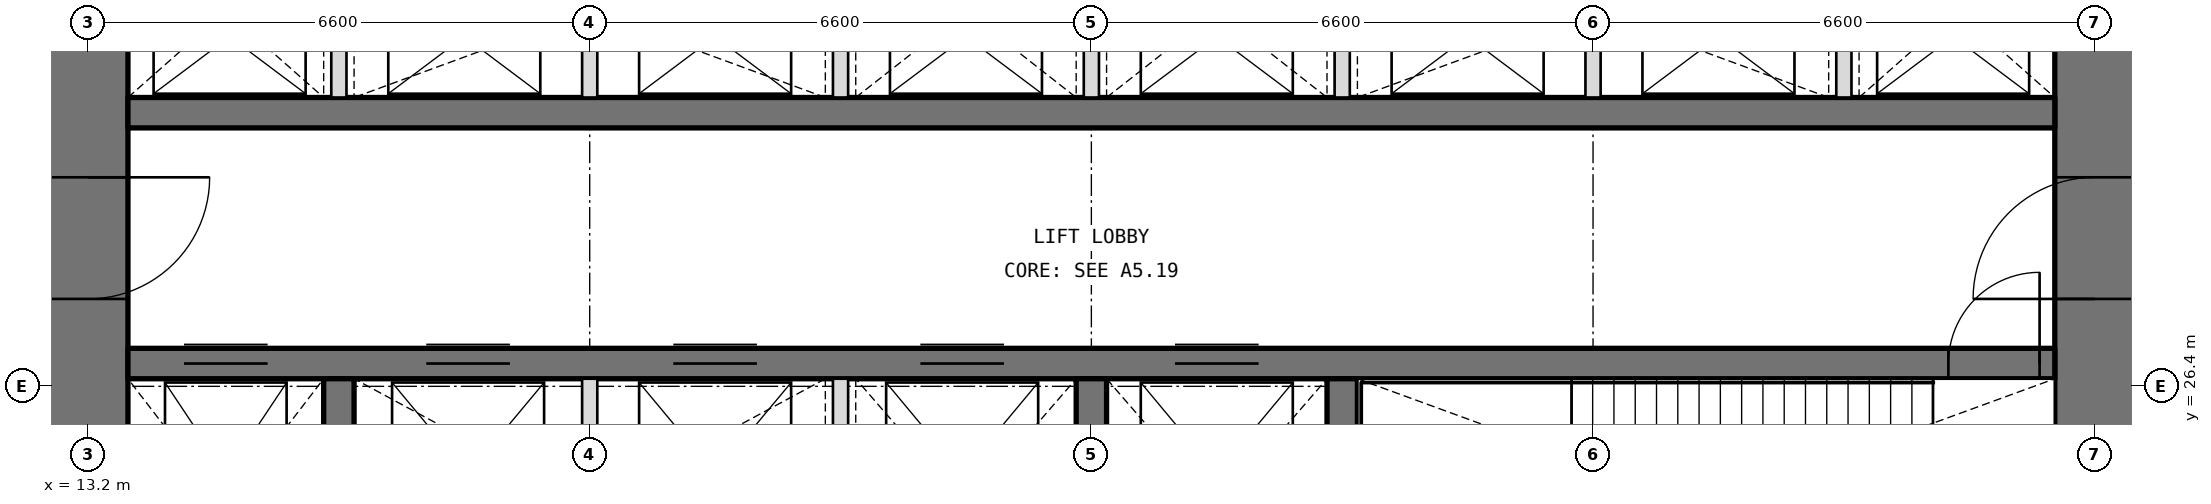
"""IFC4 building model, lengths in metres.
Left out: names, types, materials, properties, quantities, classifications, styles, units other than length and angle.
Written with IfcOpenShell. Run it as: python <this file> out.ifc"""

import sys

from ifc_helpers import new_model, si_unit, direction, frame, frame_2d, origin, place, context, subcontext, project, spatial, rectangle, extrude, element, fill, save


model = new_model("IFC4")
c1 = context("Model", 3, precision=1e-05, world=origin(), true_north=direction((0.0, 1.0)))
c2 = subcontext(c1, "Body", "Model", "MODEL_VIEW")
j1 = project(units=[si_unit("LENGTHUNIT", "METRE"), si_unit("PLANEANGLEUNIT", "RADIAN")], contexts=[c1])
p1 = place(None, origin())
s1 = spatial("IfcSite", under=j1, at=p1, CompositionType="ELEMENT")
p2 = place(p1, origin())
s2 = spatial("IfcBuilding", under=s1, at=p2, CompositionType="ELEMENT")
p3 = place(p2, frame((0.0, 0.0, 75.9)))
s3 = spatial("IfcBuildingStorey", under=s2, at=p3, CompositionType="ELEMENT", Elevation=75.9)
p4 = place(p3, frame((39.6, 13.725, 0.0), z_axis=(0.0, 0.0, 1.0), x_axis=(0.0, 1.0, 0.0)))
e1 = element("IfcWall", 1, at=p4, inside=s3, PredefinedType="SHEAR", context=c2, shape_type="SweptSolid", body=[
    extrude(rectangle(XDim=18.75, YDim=1.05, at=frame_2d((9.375, 0.0))), origin(), (0.0, 0.0, 1.0), 6.3),
])
p5 = place(p4, frame((3.025, 0.0, 0.0)))
e2 = element("IfcOpeningElement", 2, at=p5, cuts=e1, PredefinedType="OPENING", context=c2, shape_type="SweptSolid", body=[
    extrude(rectangle(XDim=1.6, YDim=2.1, at=frame_2d((0.8, 1.05))), frame((0.0, 0.535, 0.0), z_axis=(0.0, -1.0, 0.0), x_axis=(1.0, 0.0, 0.0)), (0.0, 0.0, 1.0), 1.07),
])
p6 = place(p4, frame((13.825, 0.0, 0.0)))
e3 = element("IfcOpeningElement", 3, at=p6, cuts=e1, PredefinedType="OPENING", context=c2, shape_type="SweptSolid", body=[
    extrude(rectangle(XDim=1.6, YDim=2.1, at=frame_2d((0.8, 1.05))), frame((0.0, 0.535, 0.0), z_axis=(0.0, -1.0, 0.0), x_axis=(1.0, 0.0, 0.0)), (0.0, 0.0, 1.0), 1.07),
])
p7 = place(p3, frame((13.2, 32.475, 0.0), z_axis=(0.0, 0.0, 1.0), x_axis=(0.0, -1.0, 0.0)))
e4 = element("IfcWall", 4, at=p7, inside=s3, PredefinedType="SHEAR", context=c2, shape_type="SweptSolid", body=[
    extrude(rectangle(XDim=18.75, YDim=1.05, at=frame_2d((9.375, 0.0))), origin(), (0.0, 0.0, 1.0), 6.3),
])
p8 = place(p7, frame((14.125, 0.0, 0.0)))
e5 = element("IfcOpeningElement", 5, at=p8, cuts=e4, PredefinedType="OPENING", context=c2, shape_type="SweptSolid", body=[
    extrude(rectangle(XDim=1.6, YDim=2.1, at=frame_2d((0.8, 1.05))), frame((0.0, 0.535, 0.0), z_axis=(0.0, -1.0, 0.0), x_axis=(1.0, 0.0, 0.0)), (0.0, 0.0, 1.0), 1.07),
])
p9 = place(p7, frame((3.325, 0.0, 0.0)))
e6 = element("IfcOpeningElement", 6, at=p9, cuts=e4, PredefinedType="OPENING", context=c2, shape_type="SweptSolid", body=[
    extrude(rectangle(XDim=1.6, YDim=2.1, at=frame_2d((0.8, 1.05))), frame((0.0, 0.535, 0.0), z_axis=(0.0, -1.0, 0.0), x_axis=(1.0, 0.0, 0.0)), (0.0, 0.0, 1.0), 1.07),
])
p10 = place(p3, frame((13.725, 26.7, 0.0), z_axis=(0.0, 0.0, 1.0), x_axis=(1.0, 0.0, 0.0)))
e7 = element("IfcWall", 7, at=p10, inside=s3, PredefinedType="SHEAR", context=c2, shape_type="SweptSolid", body=[
    extrude(rectangle(XDim=25.35, YDim=0.4, at=frame_2d((12.675, 0.0))), origin(), (0.0, 0.0, 1.0), 6.3),
])
p11 = place(p10, frame((23.95, 0.0, 0.0)))
e8 = element("IfcOpeningElement", 8, at=p11, cuts=e7, PredefinedType="OPENING", context=c2, shape_type="SweptSolid", body=[
    extrude(rectangle(XDim=1.2, YDim=2.1, at=frame_2d((0.6, 1.05))), frame((0.0, 0.21, 0.0), z_axis=(0.0, -1.0, 0.0), x_axis=(1.0, 0.0, 0.0)), (0.0, 0.0, 1.0), 0.42),
])
p12 = place(p10, frame((0.738, 0.0, 0.0)))
e9 = element("IfcOpeningElement", 9, at=p12, cuts=e7, PredefinedType="OPENING", context=c2, shape_type="SweptSolid", body=[
    extrude(rectangle(XDim=1.1, YDim=2.1, at=frame_2d((0.55, 1.05))), frame((0.0, 0.21, 0.0), z_axis=(0.0, -1.0, 0.0), x_axis=(1.0, 0.0, 0.0)), (0.0, 0.0, 1.0), 0.42),
])
p13 = place(p10, frame((3.925, 0.0, 0.0)))
e10 = element("IfcOpeningElement", 10, at=p13, cuts=e7, PredefinedType="OPENING", context=c2, shape_type="SweptSolid", body=[
    extrude(rectangle(XDim=1.1, YDim=2.1, at=frame_2d((0.55, 1.05))), frame((0.0, 0.21, 0.0), z_axis=(0.0, -1.0, 0.0), x_axis=(1.0, 0.0, 0.0)), (0.0, 0.0, 1.0), 0.42),
])
p14 = place(p10, frame((7.175, 0.0, 0.0)))
e11 = element("IfcOpeningElement", 11, at=p14, cuts=e7, PredefinedType="OPENING", context=c2, shape_type="SweptSolid", body=[
    extrude(rectangle(XDim=1.1, YDim=2.1, at=frame_2d((0.55, 1.05))), frame((0.0, 0.21, 0.0), z_axis=(0.0, -1.0, 0.0), x_axis=(1.0, 0.0, 0.0)), (0.0, 0.0, 1.0), 0.42),
])
p15 = place(p10, frame((10.425, 0.0, 0.0)))
e12 = element("IfcOpeningElement", 12, at=p15, cuts=e7, PredefinedType="OPENING", context=c2, shape_type="SweptSolid", body=[
    extrude(rectangle(XDim=1.1, YDim=2.1, at=frame_2d((0.55, 1.05))), frame((0.0, 0.21, 0.0), z_axis=(0.0, -1.0, 0.0), x_axis=(1.0, 0.0, 0.0)), (0.0, 0.0, 1.0), 0.42),
])
p16 = place(p10, frame((13.775, 0.0, 0.0)))
e13 = element("IfcOpeningElement", 13, at=p16, cuts=e7, PredefinedType="OPENING", context=c2, shape_type="SweptSolid", body=[
    extrude(rectangle(XDim=1.1, YDim=2.1, at=frame_2d((0.55, 1.05))), frame((0.0, 0.21, 0.0), z_axis=(0.0, -1.0, 0.0), x_axis=(1.0, 0.0, 0.0)), (0.0, 0.0, 1.0), 0.42),
])
p17 = place(p3, frame((13.725, 30.0, 0.0), z_axis=(0.0, 0.0, 1.0), x_axis=(1.0, 0.0, 0.0)))
e14 = element("IfcWall", 14, at=p17, inside=s3, PredefinedType="SHEAR", context=c2, shape_type="SweptSolid", body=[
    extrude(rectangle(XDim=25.35, YDim=0.4, at=frame_2d((12.675, 0.0))), origin(), (0.0, 0.0, 1.0), 6.3),
])
for number, where, z_axis, x_axis in (
    (15, (16.5, 23.15, 0.0), (0.0, 0.0, 1.0), (0.0, 1.0, 0.0)),
    (16, (26.4, 23.15, 0.0), (0.0, 0.0, 1.0), (0.0, 1.0, 0.0)),
    (17, (29.7, 23.15, 0.0), (0.0, 0.0, 1.0), (0.0, 1.0, 0.0)),
):
    element("IfcWall", number, at=place(p3, frame(where, z_axis=z_axis, x_axis=x_axis)), inside=s3, PredefinedType="SHEAR", context=c2, shape_type="SweptSolid", body=[
        extrude(rectangle(XDim=3.35, YDim=0.4, at=frame_2d((1.675, 0.0))), origin(), (0.0, 0.0, 1.0), 6.3),
    ])
for number, where, z_axis, x_axis in (
    (18, (16.5, 30.2, 0.0), (0.0, 0.0, 1.0), (0.0, 1.0, 0.0)),
    (19, (19.8, 30.2, 0.0), (0.0, 0.0, 1.0), (0.0, 1.0, 0.0)),
    (20, (23.1, 30.2, 0.0), (0.0, 0.0, 1.0), (0.0, 1.0, 0.0)),
    (21, (26.4, 30.2, 0.0), (0.0, 0.0, 1.0), (0.0, 1.0, 0.0)),
    (22, (29.7, 30.2, 0.0), (0.0, 0.0, 1.0), (0.0, 1.0, 0.0)),
    (23, (33.0, 30.2, 0.0), (0.0, 0.0, 1.0), (0.0, 1.0, 0.0)),
    (24, (36.3, 30.2, 0.0), (0.0, 0.0, 1.0), (0.0, 1.0, 0.0)),
):
    element("IfcWall", number, at=place(p3, frame(where, z_axis=z_axis, x_axis=x_axis)), inside=s3, PredefinedType="PARTITIONING", context=c2, shape_type="SweptSolid", body=[
        extrude(rectangle(XDim=2.275, YDim=0.2, at=frame_2d((1.138, 0.0))), origin(), (0.0, 0.0, 1.0), 6.3),
    ])
for number, where, z_axis, x_axis in (
    (25, (19.8, 23.15, 0.0), (0.0, 0.0, 1.0), (0.0, 1.0, 0.0)),
    (26, (23.1, 23.15, 0.0), (0.0, 0.0, 1.0), (0.0, 1.0, 0.0)),
):
    element("IfcWall", number, at=place(p3, frame(where, z_axis=z_axis, x_axis=x_axis)), inside=s3, PredefinedType="PARTITIONING", context=c2, shape_type="SweptSolid", body=[
        extrude(rectangle(XDim=3.35, YDim=0.2, at=frame_2d((1.675, 0.0))), origin(), (0.0, 0.0, 1.0), 6.3),
    ])
p18 = place(p11, origin())
e27 = element("IfcDoor", 27, at=p18, inside=s3, OperationType="SINGLE_SWING_RIGHT", PredefinedType="DOOR", context=c2, shape_type="SweptSolid", body=[
    extrude(rectangle(XDim=1.2, YDim=2.1, at=frame_2d((0.6, 1.05))), frame((0.0, 0.025, 0.0), z_axis=(0.0, -1.0, 0.0), x_axis=(1.0, 0.0, 0.0)), (0.0, 0.0, 1.0), 0.05),
])
fill(e8, e27)
p19 = place(p9, origin())
e28 = element("IfcDoor", 28, at=p19, inside=s3, OperationType="DOUBLE_DOOR_DOUBLE_SWING", PredefinedType="DOOR", context=c2, shape_type="SweptSolid", body=[
    extrude(rectangle(XDim=1.6, YDim=2.1, at=frame_2d((0.8, 1.05))), frame((0.0, 0.025, 0.0), z_axis=(0.0, -1.0, 0.0), x_axis=(1.0, 0.0, 0.0)), (0.0, 0.0, 1.0), 0.05),
])
fill(e6, e28)
p20 = place(p6, origin())
e29 = element("IfcDoor", 29, at=p20, inside=s3, OperationType="DOUBLE_DOOR_DOUBLE_SWING", PredefinedType="DOOR", context=c2, shape_type="SweptSolid", body=[
    extrude(rectangle(XDim=1.6, YDim=2.1, at=frame_2d((0.8, 1.05))), frame((0.0, 0.025, 0.0), z_axis=(0.0, -1.0, 0.0), x_axis=(1.0, 0.0, 0.0)), (0.0, 0.0, 1.0), 0.05),
])
fill(e3, e29)
p21 = place(p12, origin())
e30 = element("IfcDoor", 30, at=p21, inside=s3, OperationType="DOUBLE_DOOR_SLIDING", PredefinedType="DOOR", context=c2, shape_type="SweptSolid", body=[
    extrude(rectangle(XDim=1.1, YDim=2.1, at=frame_2d((0.55, 1.05))), frame((0.0, 0.025, 0.0), z_axis=(0.0, -1.0, 0.0), x_axis=(1.0, 0.0, 0.0)), (0.0, 0.0, 1.0), 0.05),
])
fill(e9, e30)
p22 = place(p13, origin())
e31 = element("IfcDoor", 31, at=p22, inside=s3, OperationType="DOUBLE_DOOR_SLIDING", PredefinedType="DOOR", context=c2, shape_type="SweptSolid", body=[
    extrude(rectangle(XDim=1.1, YDim=2.1, at=frame_2d((0.55, 1.05))), frame((0.0, 0.025, 0.0), z_axis=(0.0, -1.0, 0.0), x_axis=(1.0, 0.0, 0.0)), (0.0, 0.0, 1.0), 0.05),
])
fill(e10, e31)
p23 = place(p14, origin())
e32 = element("IfcDoor", 32, at=p23, inside=s3, OperationType="DOUBLE_DOOR_SLIDING", PredefinedType="DOOR", context=c2, shape_type="SweptSolid", body=[
    extrude(rectangle(XDim=1.1, YDim=2.1, at=frame_2d((0.55, 1.05))), frame((0.0, 0.025, 0.0), z_axis=(0.0, -1.0, 0.0), x_axis=(1.0, 0.0, 0.0)), (0.0, 0.0, 1.0), 0.05),
])
fill(e11, e32)
p24 = place(p15, origin())
e33 = element("IfcDoor", 33, at=p24, inside=s3, OperationType="DOUBLE_DOOR_SLIDING", PredefinedType="DOOR", context=c2, shape_type="SweptSolid", body=[
    extrude(rectangle(XDim=1.1, YDim=2.1, at=frame_2d((0.55, 1.05))), frame((0.0, 0.025, 0.0), z_axis=(0.0, -1.0, 0.0), x_axis=(1.0, 0.0, 0.0)), (0.0, 0.0, 1.0), 0.05),
])
fill(e12, e33)
p25 = place(p16, origin())
e34 = element("IfcDoor", 34, at=p25, inside=s3, OperationType="DOUBLE_DOOR_SLIDING", PredefinedType="DOOR", context=c2, shape_type="SweptSolid", body=[
    extrude(rectangle(XDim=1.1, YDim=2.1, at=frame_2d((0.55, 1.05))), frame((0.0, 0.025, 0.0), z_axis=(0.0, -1.0, 0.0), x_axis=(1.0, 0.0, 0.0)), (0.0, 0.0, 1.0), 0.05),
])
fill(e13, e34)
save(model, sys.argv[1])
